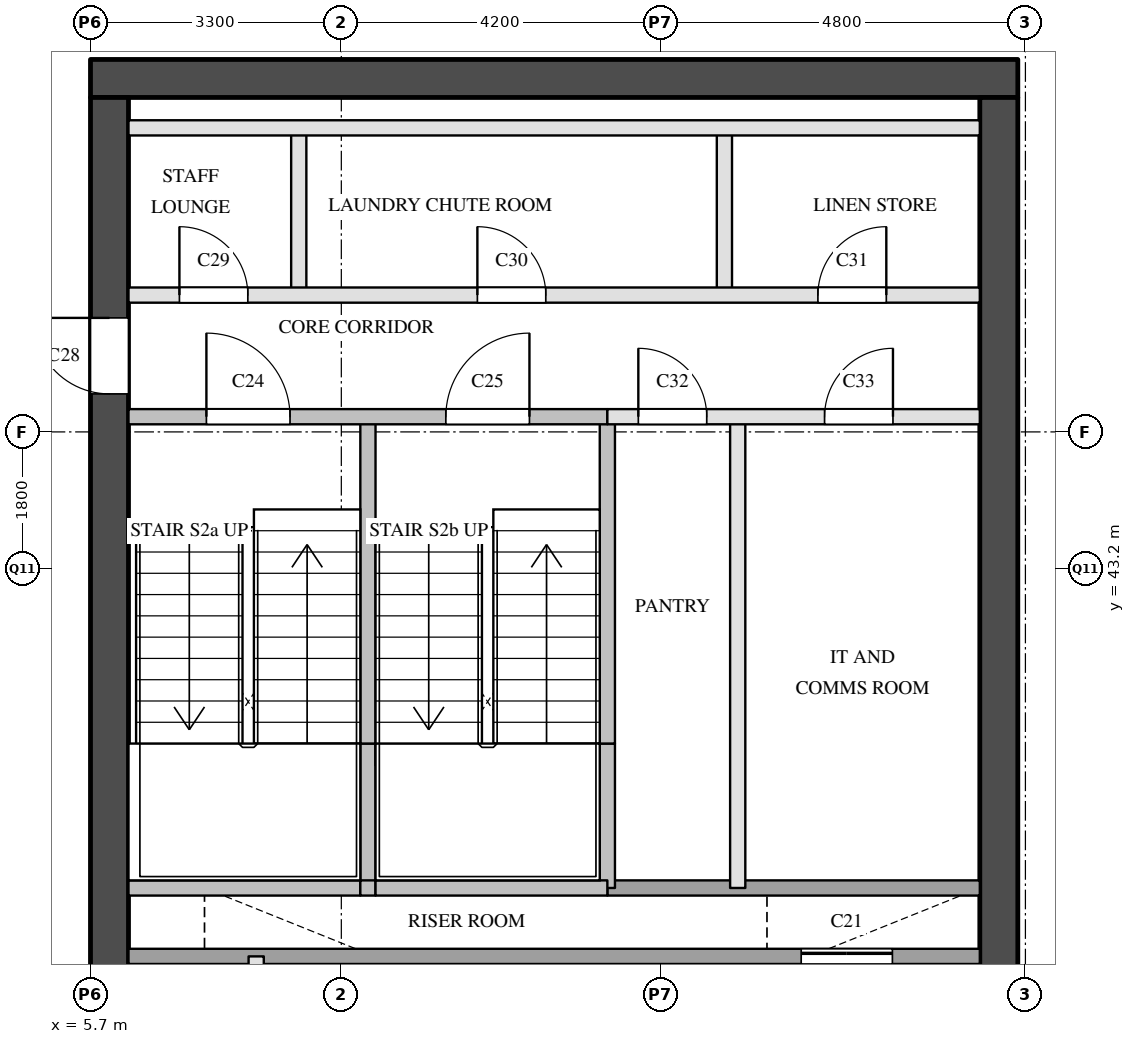
"""IFC4 building model, lengths in metres.
Left out: names, types, materials, properties, quantities, classifications, styles, units other than length and angle.
Written with IfcOpenShell. Run it as: python <this file> out.ifc"""

import sys

from ifc_helpers import new_model, si_unit, direction, frame, frame_2d, origin, place, context, subcontext, project, spatial, rectangle, extrude, element, fill, save


model = new_model("IFC4")
c1 = context("Model", 3, precision=1e-05, world=origin(), true_north=direction((0.0, 1.0)))
c2 = subcontext(c1, "Body", "Model", "MODEL_VIEW")
j1 = project(units=[si_unit("LENGTHUNIT", "METRE"), si_unit("PLANEANGLEUNIT", "RADIAN")], contexts=[c1])
p1 = place(None, origin())
s1 = spatial("IfcSite", under=j1, at=p1, CompositionType="ELEMENT")
p2 = place(p1, origin())
s2 = spatial("IfcBuilding", under=s1, at=p2, CompositionType="ELEMENT")
p3 = place(p2, frame((0.0, 0.0, 189.5)))
s3 = spatial("IfcBuildingStorey", under=s2, at=p3, CompositionType="ELEMENT", Elevation=189.5)
p4 = place(p3, frame((5.7, 49.65, 0.0), z_axis=(0.0, 0.0, 1.0), x_axis=(1.0, 0.0, 0.0)))
e1 = element("IfcWall", 1, at=p4, inside=s3, PredefinedType="SHEAR", context=c2, shape_type="SweptSolid", body=[
    extrude(rectangle(XDim=12.2, YDim=0.5, at=frame_2d((6.1, 0.0))), origin(), (0.0, 0.0, 1.0), 3.6),
])
p5 = place(p3, frame((5.95, 29.1, 0.0), z_axis=(0.0, 0.0, 1.0), x_axis=(0.0, 1.0, 0.0)))
e2 = element("IfcWall", 2, at=p5, inside=s3, PredefinedType="SHEAR", context=c2, shape_type="SweptSolid", body=[
    extrude(rectangle(XDim=20.3, YDim=0.5, at=frame_2d((10.15, 0.0))), origin(), (0.0, 0.0, 1.0), 3.6),
])
p6 = place(p5, frame((3.45, 0.0, 0.0)))
e3 = element("IfcOpeningElement", 3, at=p6, cuts=e2, PredefinedType="OPENING", context=c2, shape_type="SweptSolid", body=[
    extrude(rectangle(XDim=1.0, YDim=2.1, at=frame_2d((0.5, 1.05))), frame((0.0, 0.26, 0.0), z_axis=(0.0, -1.0, 0.0), x_axis=(1.0, 0.0, 0.0)), (0.0, 0.0, 1.0), 0.52),
])
p7 = place(p5, frame((16.4, 0.0, 0.0)))
e4 = element("IfcOpeningElement", 4, at=p7, cuts=e2, PredefinedType="OPENING", context=c2, shape_type="SweptSolid", body=[
    extrude(rectangle(XDim=1.0, YDim=2.1, at=frame_2d((0.5, 1.05))), frame((0.0, 0.26, 0.0), z_axis=(0.0, -1.0, 0.0), x_axis=(1.0, 0.0, 0.0)), (0.0, 0.0, 1.0), 0.52),
])
p8 = place(p3, frame((17.65, 29.1, 0.0), z_axis=(0.0, 0.0, 1.0), x_axis=(0.0, 1.0, 0.0)))
e5 = element("IfcWall", 5, at=p8, inside=s3, PredefinedType="SHEAR", context=c2, shape_type="SweptSolid", body=[
    extrude(rectangle(XDim=20.3, YDim=0.5, at=frame_2d((10.15, 0.0))), origin(), (0.0, 0.0, 1.0), 3.6),
])
p9 = place(p8, frame((1.25, 0.0, 0.0)))
e6 = element("IfcOpeningElement", 6, at=p9, cuts=e5, PredefinedType="OPENING", context=c2, shape_type="SweptSolid", body=[
    extrude(rectangle(XDim=0.7, YDim=2.1, at=frame_2d((0.35, 1.05))), frame((0.0, 0.26, 0.0), z_axis=(0.0, -1.0, 0.0), x_axis=(1.0, 0.0, 0.0)), (0.0, 0.0, 1.0), 0.52),
])
p10 = place(p8, frame((7.05, 0.0, 0.0)))
e7 = element("IfcOpeningElement", 7, at=p10, cuts=e5, PredefinedType="OPENING", context=c2, shape_type="SweptSolid", body=[
    extrude(rectangle(XDim=0.7, YDim=2.1, at=frame_2d((0.35, 1.05))), frame((0.0, 0.26, 0.0), z_axis=(0.0, -1.0, 0.0), x_axis=(1.0, 0.0, 0.0)), (0.0, 0.0, 1.0), 0.52),
])
p11 = place(p8, frame((3.6, 0.0, 0.0)))
e8 = element("IfcOpeningElement", 8, at=p11, cuts=e5, PredefinedType="OPENING", context=c2, shape_type="SweptSolid", body=[
    extrude(rectangle(XDim=1.8, YDim=2.1, at=frame_2d((0.9, 1.05))), frame((0.0, 0.26, 0.0), z_axis=(0.0, -1.0, 0.0), x_axis=(1.0, 0.0, 0.0)), (0.0, 0.0, 1.0), 0.52),
])
p12 = place(p3, frame((7.88, 33.8, 0.0), z_axis=(0.0, 0.0, 1.0), x_axis=(0.0, 1.0, 0.0)))
e9 = element("IfcWall", 9, at=p12, inside=s3, PredefinedType="PARTITIONING", context=c2, shape_type="SweptSolid", body=[
    extrude(rectangle(XDim=4.3, YDim=0.2, at=frame_2d((2.15, 0.0))), origin(), (0.0, 0.0, 1.0), 3.6),
])
p13 = place(p3, frame((8.44, 46.8, 0.0), z_axis=(0.0, 0.0, 1.0), x_axis=(0.0, 1.0, 0.0)))
e10 = element("IfcWall", 10, at=p13, inside=s3, PredefinedType="PARTITIONING", context=c2, shape_type="SweptSolid", body=[
    extrude(rectangle(XDim=2.2, YDim=0.2, at=frame_2d((1.1, 0.0))), origin(), (0.0, 0.0, 1.0), 3.6),
])
p14 = place(p3, frame((9.35, 39.0, 0.0), z_axis=(0.0, 0.0, 1.0), x_axis=(0.0, 1.0, 0.0)))
e11 = element("IfcWall", 11, at=p14, inside=s3, PredefinedType="SOLIDWALL", context=c2, shape_type="SweptSolid", body=[
    extrude(rectangle(XDim=1.9, YDim=0.2, at=frame_2d((0.95, 0.0))), origin(), (0.0, 0.0, 1.0), 3.6),
])
p15 = place(p3, frame((9.35, 40.9, 0.0), z_axis=(0.0, 0.0, 1.0), x_axis=(0.0, 1.0, 0.0)))
e12 = element("IfcWall", 12, at=p15, inside=s3, PredefinedType="SOLIDWALL", context=c2, shape_type="SweptSolid", body=[
    extrude(rectangle(XDim=4.3, YDim=0.2, at=frame_2d((2.15, 0.0))), origin(), (0.0, 0.0, 1.0), 3.6),
])
p16 = place(p3, frame((12.5, 39.0, 0.0), z_axis=(0.0, 0.0, 1.0), x_axis=(0.0, 1.0, 0.0)))
e13 = element("IfcWall", 13, at=p16, inside=s3, PredefinedType="SOLIDWALL", context=c2, shape_type="SweptSolid", body=[
    extrude(rectangle(XDim=1.9, YDim=0.2, at=frame_2d((0.95, 0.0))), origin(), (0.0, 0.0, 1.0), 3.6),
])
p17 = place(p3, frame((12.5, 40.9, 0.0), z_axis=(0.0, 0.0, 1.0), x_axis=(0.0, 1.0, 0.0)))
e14 = element("IfcWall", 14, at=p17, inside=s3, PredefinedType="SOLIDWALL", context=c2, shape_type="SweptSolid", body=[
    extrude(rectangle(XDim=4.3, YDim=0.2, at=frame_2d((2.15, 0.0))), origin(), (0.0, 0.0, 1.0), 3.6),
])
p18 = place(p3, frame((14.04, 46.8, 0.0), z_axis=(0.0, 0.0, 1.0), x_axis=(0.0, 1.0, 0.0)))
e15 = element("IfcWall", 15, at=p18, inside=s3, PredefinedType="PARTITIONING", context=c2, shape_type="SweptSolid", body=[
    extrude(rectangle(XDim=2.2, YDim=0.2, at=frame_2d((1.1, 0.0))), origin(), (0.0, 0.0, 1.0), 3.6),
])
p19 = place(p3, frame((14.215, 39.0, 0.0), z_axis=(0.0, 0.0, 1.0), x_axis=(0.0, 1.0, 0.0)))
e16 = element("IfcWall", 16, at=p19, inside=s3, PredefinedType="PARTITIONING", context=c2, shape_type="SweptSolid", body=[
    extrude(rectangle(XDim=6.2, YDim=0.2, at=frame_2d((3.1, 0.0))), origin(), (0.0, 0.0, 1.0), 3.6),
])
for number, where, z_axis, x_axis in (
    (17, (14.6, 34.9, 0.0), (0.0, 0.0, 1.0), (0.0, 1.0, 0.0)),
    (18, (16.7, 34.9, 0.0), (0.0, 0.0, 1.0), (0.0, 1.0, 0.0)),
):
    element("IfcWall", number, at=place(p3, frame(where, z_axis=z_axis, x_axis=x_axis)), inside=s3, PredefinedType="SOLIDWALL", context=c2, shape_type="SweptSolid", body=[
        extrude(rectangle(XDim=3.2, YDim=0.2, at=frame_2d((1.6, 0.0))), origin(), (0.0, 0.0, 1.0), 3.6),
    ])
p20 = place(p3, frame((6.2, 38.1, 0.0), z_axis=(0.0, 0.0, 1.0), x_axis=(1.0, 0.0, 0.0)))
e19 = element("IfcWall", 19, at=p20, inside=s3, PredefinedType="SOLIDWALL", context=c2, shape_type="SweptSolid", body=[
    extrude(rectangle(XDim=11.2, YDim=0.2, at=frame_2d((5.6, 0.0))), origin(), (0.0, 0.0, 1.0), 3.6),
])
p21 = place(p20, frame((8.85, 0.0, 0.0)))
e20 = element("IfcOpeningElement", 20, at=p21, cuts=e19, PredefinedType="OPENING", context=c2, shape_type="SweptSolid", body=[
    extrude(rectangle(XDim=1.2, YDim=2.1, at=frame_2d((0.6, 1.05))), frame((0.0, 0.11, 0.0), z_axis=(0.0, -1.0, 0.0), x_axis=(1.0, 0.0, 0.0)), (0.0, 0.0, 1.0), 0.22),
])
p22 = place(p3, frame((12.5, 39.0, 0.0), z_axis=(0.0, 0.0, 1.0), x_axis=(1.0, 0.0, 0.0)))
e21 = element("IfcWall", 21, at=p22, inside=s3, PredefinedType="SOLIDWALL", context=c2, shape_type="SweptSolid", body=[
    extrude(rectangle(XDim=4.9, YDim=0.2, at=frame_2d((2.45, 0.0))), origin(), (0.0, 0.0, 1.0), 3.6),
])
p23 = place(p3, frame((6.2, 39.0, 0.0), z_axis=(0.0, 0.0, 1.0), x_axis=(1.0, 0.0, 0.0)))
e22 = element("IfcWall", 22, at=p23, inside=s3, PredefinedType="SOLIDWALL", context=c2, shape_type="SweptSolid", body=[
    extrude(rectangle(XDim=3.05, YDim=0.2, at=frame_2d((1.525, 0.0))), origin(), (0.0, 0.0, 1.0), 3.6),
])
p24 = place(p3, frame((9.25, 39.0, 0.0), z_axis=(0.0, 0.0, 1.0), x_axis=(1.0, 0.0, 0.0)))
e23 = element("IfcWall", 23, at=p24, inside=s3, PredefinedType="SOLIDWALL", context=c2, shape_type="SweptSolid", body=[
    extrude(rectangle(XDim=0.2, YDim=0.2, at=frame_2d((0.1, 0.0))), origin(), (0.0, 0.0, 1.0), 3.6),
])
p25 = place(p3, frame((9.45, 39.0, 0.0), z_axis=(0.0, 0.0, 1.0), x_axis=(1.0, 0.0, 0.0)))
e24 = element("IfcWall", 24, at=p25, inside=s3, PredefinedType="SOLIDWALL", context=c2, shape_type="SweptSolid", body=[
    extrude(rectangle(XDim=3.05, YDim=0.2, at=frame_2d((1.525, 0.0))), origin(), (0.0, 0.0, 1.0), 3.6),
])
p26 = place(p3, frame((12.5, 45.2, 0.0), z_axis=(0.0, 0.0, 1.0), x_axis=(1.0, 0.0, 0.0)))
e25 = element("IfcWall", 25, at=p26, inside=s3, PredefinedType="PARTITIONING", context=c2, shape_type="SweptSolid", body=[
    extrude(rectangle(XDim=4.9, YDim=0.2, at=frame_2d((2.45, 0.0))), origin(), (0.0, 0.0, 1.0), 3.6),
])
p27 = place(p26, frame((0.407, 0.0, 0.0)))
e26 = element("IfcOpeningElement", 26, at=p27, cuts=e25, PredefinedType="OPENING", context=c2, shape_type="SweptSolid", body=[
    extrude(rectangle(XDim=0.9, YDim=2.1, at=frame_2d((0.45, 1.05))), frame((0.0, 0.11, 0.0), z_axis=(0.0, -1.0, 0.0), x_axis=(1.0, 0.0, 0.0)), (0.0, 0.0, 1.0), 0.22),
])
p28 = place(p26, frame((2.857, 0.0, 0.0)))
e27 = element("IfcOpeningElement", 27, at=p28, cuts=e25, PredefinedType="OPENING", context=c2, shape_type="SweptSolid", body=[
    extrude(rectangle(XDim=0.9, YDim=2.1, at=frame_2d((0.45, 1.05))), frame((0.0, 0.11, 0.0), z_axis=(0.0, -1.0, 0.0), x_axis=(1.0, 0.0, 0.0)), (0.0, 0.0, 1.0), 0.22),
])
p29 = place(p3, frame((6.2, 45.2, 0.0), z_axis=(0.0, 0.0, 1.0), x_axis=(1.0, 0.0, 0.0)))
e28 = element("IfcWall", 28, at=p29, inside=s3, PredefinedType="SOLIDWALL", context=c2, shape_type="SweptSolid", body=[
    extrude(rectangle(XDim=6.3, YDim=0.2, at=frame_2d((3.15, 0.0))), origin(), (0.0, 0.0, 1.0), 3.6),
])
p30 = place(p29, frame((1.025, 0.0, 0.0)))
e29 = element("IfcOpeningElement", 29, at=p30, cuts=e28, PredefinedType="OPENING", context=c2, shape_type="SweptSolid", body=[
    extrude(rectangle(XDim=1.1, YDim=2.1, at=frame_2d((0.55, 1.05))), frame((0.0, 0.11, 0.0), z_axis=(0.0, -1.0, 0.0), x_axis=(1.0, 0.0, 0.0)), (0.0, 0.0, 1.0), 0.22),
])
p31 = place(p29, frame((4.175, 0.0, 0.0)))
e30 = element("IfcOpeningElement", 30, at=p31, cuts=e28, PredefinedType="OPENING", context=c2, shape_type="SweptSolid", body=[
    extrude(rectangle(XDim=1.1, YDim=2.1, at=frame_2d((0.55, 1.05))), frame((0.0, 0.11, 0.0), z_axis=(0.0, -1.0, 0.0), x_axis=(1.0, 0.0, 0.0)), (0.0, 0.0, 1.0), 0.22),
])
p32 = place(p3, frame((6.2, 46.8, 0.0), z_axis=(0.0, 0.0, 1.0), x_axis=(1.0, 0.0, 0.0)))
e31 = element("IfcWall", 31, at=p32, inside=s3, PredefinedType="PARTITIONING", context=c2, shape_type="SweptSolid", body=[
    extrude(rectangle(XDim=11.2, YDim=0.2, at=frame_2d((5.6, 0.0))), origin(), (0.0, 0.0, 1.0), 3.6),
])
p33 = place(p32, frame((0.67, 0.0, 0.0)))
e32 = element("IfcOpeningElement", 32, at=p33, cuts=e31, PredefinedType="OPENING", context=c2, shape_type="SweptSolid", body=[
    extrude(rectangle(XDim=0.9, YDim=2.1, at=frame_2d((0.45, 1.05))), frame((0.0, 0.11, 0.0), z_axis=(0.0, -1.0, 0.0), x_axis=(1.0, 0.0, 0.0)), (0.0, 0.0, 1.0), 0.22),
])
p34 = place(p32, frame((4.59, 0.0, 0.0)))
e33 = element("IfcOpeningElement", 33, at=p34, cuts=e31, PredefinedType="OPENING", context=c2, shape_type="SweptSolid", body=[
    extrude(rectangle(XDim=0.9, YDim=2.1, at=frame_2d((0.45, 1.05))), frame((0.0, 0.11, 0.0), z_axis=(0.0, -1.0, 0.0), x_axis=(1.0, 0.0, 0.0)), (0.0, 0.0, 1.0), 0.22),
])
p35 = place(p32, frame((9.07, 0.0, 0.0)))
e34 = element("IfcOpeningElement", 34, at=p35, cuts=e31, PredefinedType="OPENING", context=c2, shape_type="SweptSolid", body=[
    extrude(rectangle(XDim=0.9, YDim=2.1, at=frame_2d((0.45, 1.05))), frame((0.0, 0.11, 0.0), z_axis=(0.0, -1.0, 0.0), x_axis=(1.0, 0.0, 0.0)), (0.0, 0.0, 1.0), 0.22),
])
p36 = place(p3, frame((6.2, 49.0, 0.0), z_axis=(0.0, 0.0, 1.0), x_axis=(1.0, 0.0, 0.0)))
e35 = element("IfcWall", 35, at=p36, inside=s3, PredefinedType="PARTITIONING", context=c2, shape_type="SweptSolid", body=[
    extrude(rectangle(XDim=11.2, YDim=0.2, at=frame_2d((5.6, 0.0))), origin(), (0.0, 0.0, 1.0), 3.6),
])
p37 = place(p21, origin())
e36 = element("IfcDoor", 36, at=p37, inside=s3, OperationType="SLIDING_TO_LEFT", PredefinedType="DOOR", context=c2, shape_type="SweptSolid", body=[
    extrude(rectangle(XDim=1.2, YDim=2.1, at=frame_2d((0.6, 1.05))), frame((0.0, 0.025, 0.0), z_axis=(0.0, -1.0, 0.0), x_axis=(1.0, 0.0, 0.0)), (0.0, 0.0, 1.0), 0.05),
])
fill(e20, e36)
p38 = place(p30, origin())
e37 = element("IfcDoor", 37, at=p38, inside=s3, OperationType="SINGLE_SWING_LEFT", PredefinedType="DOOR", context=c2, shape_type="SweptSolid", body=[
    extrude(rectangle(XDim=1.1, YDim=2.1, at=frame_2d((0.55, 1.05))), frame((0.0, 0.025, 0.0), z_axis=(0.0, -1.0, 0.0), x_axis=(1.0, 0.0, 0.0)), (0.0, 0.0, 1.0), 0.05),
])
fill(e29, e37)
p39 = place(p31, origin())
e38 = element("IfcDoor", 38, at=p39, inside=s3, OperationType="SINGLE_SWING_RIGHT", PredefinedType="DOOR", context=c2, shape_type="SweptSolid", body=[
    extrude(rectangle(XDim=1.1, YDim=2.1, at=frame_2d((0.55, 1.05))), frame((0.0, 0.025, 0.0), z_axis=(0.0, -1.0, 0.0), x_axis=(1.0, 0.0, 0.0)), (0.0, 0.0, 1.0), 0.05),
])
fill(e30, e38)
p40 = place(p7, origin())
e39 = element("IfcDoor", 39, at=p40, inside=s3, OperationType="SINGLE_SWING_RIGHT", PredefinedType="DOOR", context=c2, shape_type="SweptSolid", body=[
    extrude(rectangle(XDim=1.0, YDim=2.1, at=frame_2d((0.5, 1.05))), frame((0.0, 0.025, 0.0), z_axis=(0.0, -1.0, 0.0), x_axis=(1.0, 0.0, 0.0)), (0.0, 0.0, 1.0), 0.05),
])
fill(e4, e39)
p41 = place(p33, origin())
e40 = element("IfcDoor", 40, at=p41, inside=s3, OperationType="SINGLE_SWING_LEFT", PredefinedType="DOOR", context=c2, shape_type="SweptSolid", body=[
    extrude(rectangle(XDim=0.9, YDim=2.1, at=frame_2d((0.45, 1.05))), frame((0.0, 0.025, 0.0), z_axis=(0.0, -1.0, 0.0), x_axis=(1.0, 0.0, 0.0)), (0.0, 0.0, 1.0), 0.05),
])
fill(e32, e40)
p42 = place(p34, origin())
e41 = element("IfcDoor", 41, at=p42, inside=s3, OperationType="SINGLE_SWING_LEFT", PredefinedType="DOOR", context=c2, shape_type="SweptSolid", body=[
    extrude(rectangle(XDim=0.9, YDim=2.1, at=frame_2d((0.45, 1.05))), frame((0.0, 0.025, 0.0), z_axis=(0.0, -1.0, 0.0), x_axis=(1.0, 0.0, 0.0)), (0.0, 0.0, 1.0), 0.05),
])
fill(e33, e41)
p43 = place(p35, origin())
e42 = element("IfcDoor", 42, at=p43, inside=s3, OperationType="SINGLE_SWING_RIGHT", PredefinedType="DOOR", context=c2, shape_type="SweptSolid", body=[
    extrude(rectangle(XDim=0.9, YDim=2.1, at=frame_2d((0.45, 1.05))), frame((0.0, 0.025, 0.0), z_axis=(0.0, -1.0, 0.0), x_axis=(1.0, 0.0, 0.0)), (0.0, 0.0, 1.0), 0.05),
])
fill(e34, e42)
p44 = place(p27, origin())
e43 = element("IfcDoor", 43, at=p44, inside=s3, OperationType="SINGLE_SWING_LEFT", PredefinedType="DOOR", context=c2, shape_type="SweptSolid", body=[
    extrude(rectangle(XDim=0.9, YDim=2.1, at=frame_2d((0.45, 1.05))), frame((0.0, 0.025, 0.0), z_axis=(0.0, -1.0, 0.0), x_axis=(1.0, 0.0, 0.0)), (0.0, 0.0, 1.0), 0.05),
])
fill(e26, e43)
p45 = place(p28, origin())
e44 = element("IfcDoor", 44, at=p45, inside=s3, OperationType="SINGLE_SWING_RIGHT", PredefinedType="DOOR", context=c2, shape_type="SweptSolid", body=[
    extrude(rectangle(XDim=0.9, YDim=2.1, at=frame_2d((0.45, 1.05))), frame((0.0, 0.025, 0.0), z_axis=(0.0, -1.0, 0.0), x_axis=(1.0, 0.0, 0.0)), (0.0, 0.0, 1.0), 0.05),
])
fill(e27, e44)
save(model, sys.argv[1])
